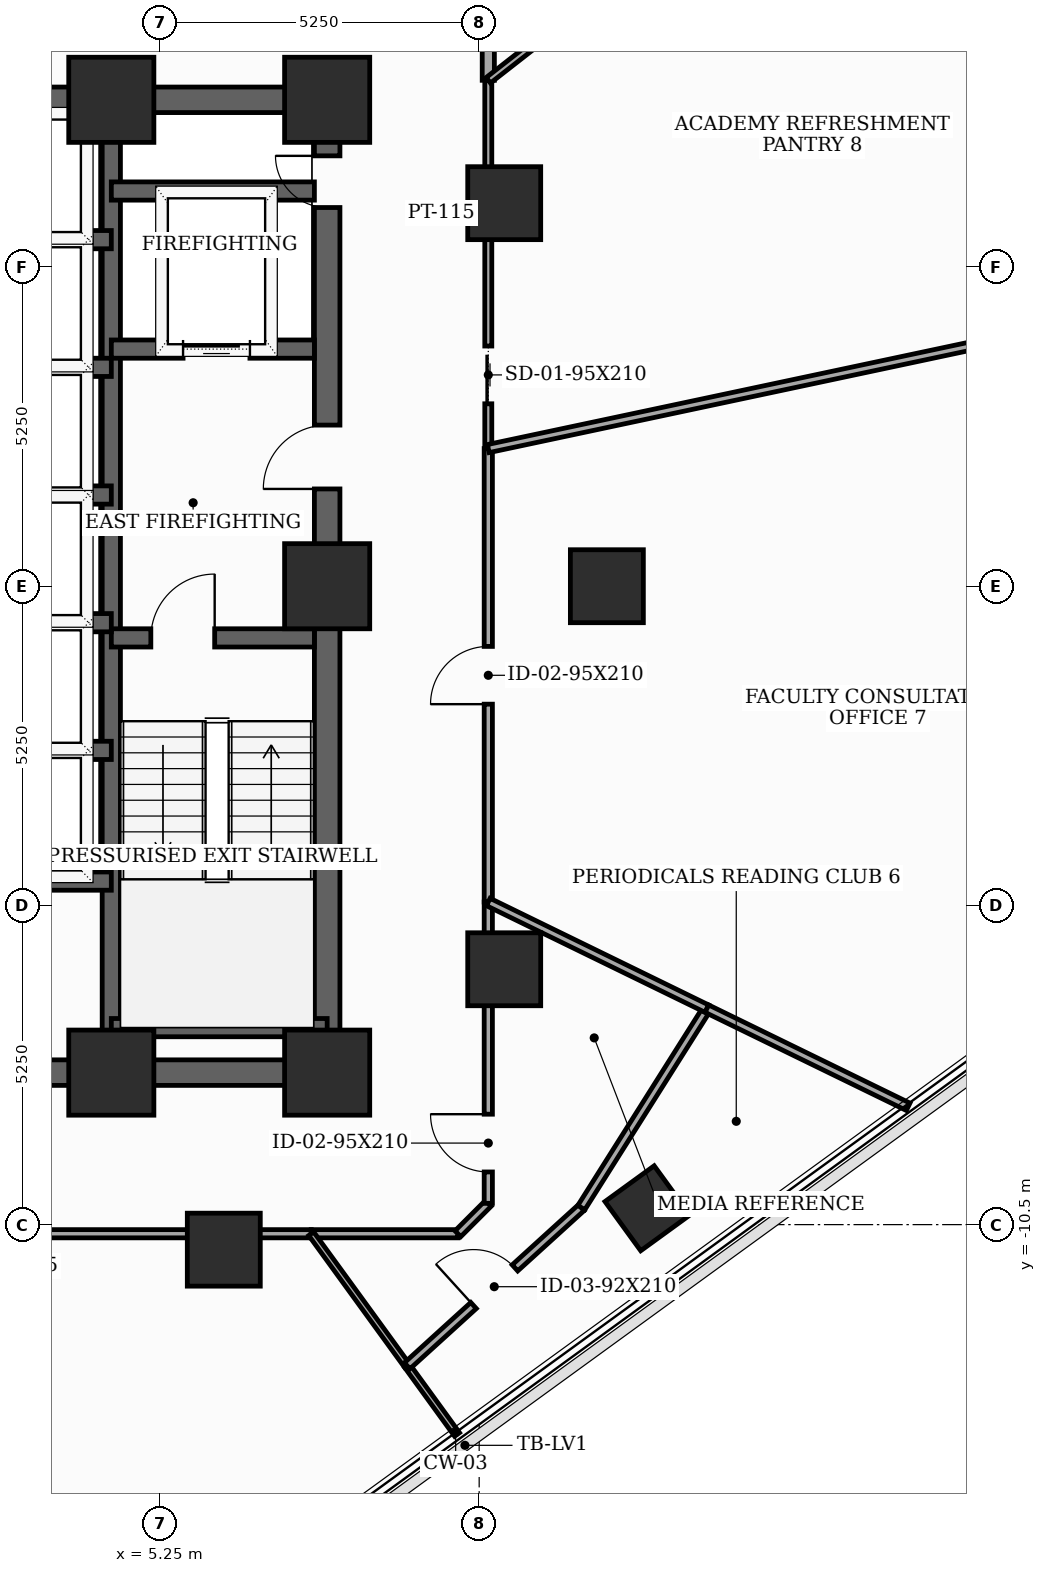
"""IFC4 building model, lengths in metres.
Left out: names, types, materials, properties, quantities, classifications, styles, units other than length and angle.
Written with IfcOpenShell. Run it as: python <this file> out.ifc"""

import sys

from ifc_helpers import new_model, si_unit, direction, frame, frame_2d, origin, origin_2d, place, context, subcontext, project, spatial, rectangle, extrude, element, fill, save


model = new_model("IFC4")
c1 = context("Model", 3, precision=1e-05, world=origin(), true_north=direction((0.0, 1.0)))
c2 = subcontext(c1, "Body", "Model", "MODEL_VIEW")
j1 = project(units=[si_unit("LENGTHUNIT", "METRE"), si_unit("PLANEANGLEUNIT", "RADIAN")], contexts=[c1])
p1 = place(None, origin())
s1 = spatial("IfcSite", under=j1, at=p1, CompositionType="ELEMENT")
p2 = place(p1, origin())
s2 = spatial("IfcBuilding", under=s1, at=p2, CompositionType="ELEMENT")
p3 = place(p2, frame((0.0, 0.0, 169.4)))
s3 = spatial("IfcBuildingStorey", under=s2, at=p3, CompositionType="ELEMENT", Elevation=169.4)
for number, where, z_axis, x_axis in (
    (1, (4.45, -8.0, 0.0), (0.0, 0.0, 1.0), (1.0, 0.0, 0.0)),
    (2, (8.0, -8.0, 0.0), (0.0, 0.0, 1.0), (1.0, 0.0, 0.0)),
    (3, (8.0, 0.0, 0.0), (0.0, 0.0, 1.0), (1.0, 0.0, 0.0)),
    (4, (8.0, 8.0, 0.0), (0.0, 0.0, 1.0), (1.0, 0.0, 0.0)),
    (5, (4.45, 8.0, 0.0), (0.0, 0.0, 1.0), (1.0, 0.0, 0.0)),
):
    element("IfcColumn", number, at=place(p3, frame(where, z_axis=z_axis, x_axis=x_axis)), inside=s3, PredefinedType="COLUMN", context=c2, shape_type="SweptSolid", body=[
        extrude(rectangle(XDim=1.4, YDim=1.4, at=origin_2d()), origin(), (0.0, 0.0, 1.0), 3.7),
    ])
for number, where, z_axis, x_axis in (
    (6, (12.6, 0.0, 0.0), (0.0, 0.0, 1.0), (1.0, 0.0, 0.0)),
    (7, (10.912, 6.3, 0.0), (0.0, 0.0, 1.0), (1.0, 0.0, 0.0)),
    (8, (6.3, -10.912, 0.0), (0.0, 0.0, 1.0), (1.0, 0.0, 0.0)),
    (9, (10.912, -6.3, 0.0), (0.0, 0.0, 1.0), (1.0, 0.0, 0.0)),
):
    element("IfcColumn", number, at=place(p3, frame(where, z_axis=z_axis, x_axis=x_axis)), inside=s3, PredefinedType="COLUMN", context=c2, shape_type="SweptSolid", body=[
        extrude(rectangle(XDim=1.2, YDim=1.2, at=origin_2d()), origin(), (0.0, 0.0, 1.0), 3.7),
    ])
p4 = place(p3, frame((13.268, -10.231, 0.0), z_axis=(0.0, 0.0, 1.0), x_axis=(0.809016994375, 0.587785252292, 0.0)))
e10 = element("IfcColumn", 10, at=p4, inside=s3, PredefinedType="COLUMN", context=c2, shape_type="SweptSolid", body=[
    extrude(rectangle(XDim=1.0, YDim=1.0, at=origin_2d()), origin(), (0.0, 0.0, 1.0), 3.7),
])
p5 = place(p3, frame((8.0, -8.0, 0.0), z_axis=(0.0, 0.0, 1.0), x_axis=(0.0, 1.0, 0.0)))
e11 = element("IfcWall", 11, at=p5, inside=s3, PredefinedType="SHEAR", context=c2, shape_type="SweptSolid", body=[
    extrude(rectangle(XDim=16.0, YDim=0.42, at=frame_2d((8.0, 0.0))), origin(), (0.0, 0.0, 1.0), 3.5),
])
p6 = place(p5, frame((9.6, 0.0, 0.0)))
e12 = element("IfcOpeningElement", 12, at=p6, cuts=e11, PredefinedType="OPENING", context=c2, shape_type="SweptSolid", body=[
    extrude(rectangle(XDim=1.05, YDim=2.15, at=frame_2d((0.525, 1.075))), frame((0.0, 0.22, 0.0), z_axis=(0.0, -1.0, 0.0), x_axis=(1.0, 0.0, 0.0)), (0.0, 0.0, 1.0), 0.44),
])
p7 = place(p5, frame((14.229, 0.0, 0.0)))
e13 = element("IfcOpeningElement", 13, at=p7, cuts=e11, PredefinedType="OPENING", context=c2, shape_type="SweptSolid", body=[
    extrude(rectangle(XDim=0.85, YDim=2.02, at=frame_2d((0.425, 1.01))), frame((0.0, 0.22, 0.0), z_axis=(0.0, -1.0, 0.0), x_axis=(1.0, 0.0, 0.0)), (0.0, 0.0, 1.0), 0.44),
])
p8 = place(p3, frame((-8.0, -8.0, 0.0), z_axis=(0.0, 0.0, 1.0), x_axis=(1.0, 0.0, 0.0)))
e14 = element("IfcWall", 14, at=p8, inside=s3, PredefinedType="SHEAR", context=c2, shape_type="SweptSolid", body=[
    extrude(rectangle(XDim=16.0, YDim=0.42, at=frame_2d((8.0, 0.0))), origin(), (0.0, 0.0, 1.0), 3.5),
])
p9 = place(p8, frame((4.6, 0.0, 0.0)))
e15 = element("IfcOpeningElement", 15, at=p9, cuts=e14, PredefinedType="OPENING", context=c2, shape_type="SweptSolid", body=[
    extrude(rectangle(XDim=0.95, YDim=2.1, at=frame_2d((0.475, 1.05))), frame((0.0, 0.22, 0.0), z_axis=(0.0, -1.0, 0.0), x_axis=(1.0, 0.0, 0.0)), (0.0, 0.0, 1.0), 0.44),
])
p10 = place(p8, frame((7.52, 0.0, 0.0)))
e16 = element("IfcOpeningElement", 16, at=p10, cuts=e14, PredefinedType="OPENING", context=c2, shape_type="SweptSolid", body=[
    extrude(rectangle(XDim=0.95, YDim=2.1, at=frame_2d((0.475, 1.05))), frame((0.0, 0.22, 0.0), z_axis=(0.0, -1.0, 0.0), x_axis=(1.0, 0.0, 0.0)), (0.0, 0.0, 1.0), 0.44),
])
p11 = place(p8, frame((10.45, 0.0, 0.0)))
e17 = element("IfcOpeningElement", 17, at=p11, cuts=e14, PredefinedType="OPENING", context=c2, shape_type="SweptSolid", body=[
    extrude(rectangle(XDim=0.95, YDim=2.1, at=frame_2d((0.475, 1.05))), frame((0.0, 0.22, 0.0), z_axis=(0.0, -1.0, 0.0), x_axis=(1.0, 0.0, 0.0)), (0.0, 0.0, 1.0), 0.44),
])
p12 = place(p3, frame((-8.0, 8.0, 0.0), z_axis=(0.0, 0.0, 1.0), x_axis=(1.0, 0.0, 0.0)))
e18 = element("IfcWall", 18, at=p12, inside=s3, PredefinedType="SHEAR", context=c2, shape_type="SweptSolid", body=[
    extrude(rectangle(XDim=16.0, YDim=0.42, at=frame_2d((8.0, 0.0))), origin(), (0.0, 0.0, 1.0), 3.5),
])
p13 = place(p12, frame((7.1, 0.0, 0.0)))
e19 = element("IfcOpeningElement", 19, at=p13, cuts=e18, PredefinedType="OPENING", context=c2, shape_type="SweptSolid", body=[
    extrude(rectangle(XDim=1.8, YDim=2.15, at=frame_2d((0.9, 1.075))), frame((0.0, 0.22, 0.0), z_axis=(0.0, -1.0, 0.0), x_axis=(1.0, 0.0, 0.0)), (0.0, 0.0, 1.0), 0.44),
])
p14 = place(p3, frame((4.45, -7.79, 0.0), z_axis=(0.0, 0.0, 1.0), x_axis=(0.0, 1.0, 0.0)))
e20 = element("IfcWall", 20, at=p14, inside=s3, PredefinedType="SHEAR", context=c2, shape_type="SweptSolid", body=[
    extrude(rectangle(XDim=15.58, YDim=0.3, at=frame_2d((7.79, 0.0))), origin(), (0.0, 0.0, 1.0), 3.5),
])
p15 = place(p3, frame((4.45, -0.85, 0.0), z_axis=(0.0, 0.0, 1.0), x_axis=(1.0, 0.0, 0.0)))
e21 = element("IfcWall", 21, at=p15, inside=s3, PredefinedType="SHEAR", context=c2, shape_type="SweptSolid", body=[
    extrude(rectangle(XDim=3.34, YDim=0.3, at=frame_2d((1.67, 0.0))), origin(), (0.0, 0.0, 1.0), 3.5),
])
p16 = place(p15, frame((0.65, 0.0, 0.0)))
e22 = element("IfcOpeningElement", 22, at=p16, cuts=e21, PredefinedType="OPENING", context=c2, shape_type="SweptSolid", body=[
    extrude(rectangle(XDim=1.05, YDim=2.15, at=frame_2d((0.525, 1.075))), frame((0.0, 0.16, 0.0), z_axis=(0.0, -1.0, 0.0), x_axis=(1.0, 0.0, 0.0)), (0.0, 0.0, 1.0), 0.32),
])
p17 = place(p3, frame((4.45, -7.26, 0.0), z_axis=(0.0, 0.0, 1.0), x_axis=(1.0, 0.0, 0.0)))
e23 = element("IfcWall", 23, at=p17, inside=s3, PredefinedType="SHEAR", context=c2, shape_type="SweptSolid", body=[
    extrude(rectangle(XDim=3.55, YDim=0.3, at=frame_2d((1.775, 0.0))), origin(), (0.0, 0.0, 1.0), 3.5),
])
p18 = place(p3, frame((4.45, 3.9, 0.0), z_axis=(0.0, 0.0, 1.0), x_axis=(1.0, 0.0, 0.0)))
e24 = element("IfcWall", 24, at=p18, inside=s3, PredefinedType="SHEAR", context=c2, shape_type="SweptSolid", body=[
    extrude(rectangle(XDim=3.34, YDim=0.3, at=frame_2d((1.67, 0.0))), origin(), (0.0, 0.0, 1.0), 3.5),
])
p19 = place(p18, frame((1.18, 0.0, 0.0)))
e25 = element("IfcOpeningElement", 25, at=p19, cuts=e24, PredefinedType="OPENING", context=c2, shape_type="SweptSolid", body=[
    extrude(rectangle(XDim=1.1, YDim=2.1, at=frame_2d((0.55, 1.05))), frame((0.0, 0.16, 0.0), z_axis=(0.0, -1.0, 0.0), x_axis=(1.0, 0.0, 0.0)), (0.0, 0.0, 1.0), 0.32),
])
p20 = place(p3, frame((4.45, 6.5, 0.0), z_axis=(0.0, 0.0, 1.0), x_axis=(1.0, 0.0, 0.0)))
e26 = element("IfcWall", 26, at=p20, inside=s3, PredefinedType="SHEAR", context=c2, shape_type="SweptSolid", body=[
    extrude(rectangle(XDim=3.34, YDim=0.3, at=frame_2d((1.67, 0.0))), origin(), (0.0, 0.0, 1.0), 3.5),
])
p21 = place(p3, frame((-4.45, -4.85, 0.0), z_axis=(0.0, 0.0, 1.0), x_axis=(1.0, 0.0, 0.0)))
e27 = element("IfcWall", 27, at=p21, inside=s3, PredefinedType="SHEAR", context=c2, shape_type="SweptSolid", body=[
    extrude(rectangle(XDim=8.9, YDim=0.3, at=frame_2d((4.45, 0.0))), origin(), (0.0, 0.0, 1.0), 3.5),
])
for number, where, z_axis, x_axis in (
    (28, (1.68, 1.5, 0.0), (0.0, 0.0, 1.0), (1.0, 0.0, 0.0)),
    (29, (1.68, 3.6, 0.0), (0.0, 0.0, 1.0), (1.0, 0.0, 0.0)),
    (30, (1.68, 5.7, 0.0), (0.0, 0.0, 1.0), (1.0, 0.0, 0.0)),
    (31, (1.68, -2.7, 0.0), (0.0, 0.0, 1.0), (1.0, 0.0, 0.0)),
    (32, (1.68, -0.6, 0.0), (0.0, 0.0, 1.0), (1.0, 0.0, 0.0)),
):
    element("IfcWall", number, at=place(p3, frame(where, z_axis=z_axis, x_axis=x_axis)), inside=s3, PredefinedType="SHEAR", context=c2, shape_type="SweptSolid", body=[
        extrude(rectangle(XDim=2.77, YDim=0.3, at=frame_2d((1.385, 0.0))), origin(), (0.0, 0.0, 1.0), 3.5),
    ])
p22 = place(p3, frame((-3.054, -10.65, 0.0), z_axis=(0.0, 0.0, 1.0), x_axis=(1.0, 0.0, 0.0)))
e33 = element("IfcWall", 33, at=p22, inside=s3, PredefinedType="PARTITIONING", context=c2, shape_type="SweptSolid", body=[
    extrude(rectangle(XDim=10.792, YDim=0.135, at=frame_2d((5.396, 0.0))), origin(), (0.0, 0.0, 1.0), 2.885),
])
p23 = place(p22, frame((4.596, 0.0, 0.0)))
e34 = element("IfcOpeningElement", 34, at=p23, cuts=e33, PredefinedType="OPENING", context=c2, shape_type="SweptSolid", body=[
    extrude(rectangle(XDim=1.6, YDim=2.15, at=frame_2d((0.8, 1.075))), frame((0.0, 0.077, 0.0), z_axis=(0.0, -1.0, 0.0), x_axis=(1.0, 0.0, 0.0)), (0.0, 0.0, 1.0), 0.155),
])
p24 = place(p3, frame((7.738, -10.65, 0.0), z_axis=(0.0, 0.0, 1.0), x_axis=(1.0, 0.0, 0.0)))
e35 = element("IfcWall", 35, at=p24, inside=s3, PredefinedType="PARTITIONING", context=c2, shape_type="SweptSolid", body=[
    extrude(rectangle(XDim=2.412, YDim=0.135, at=frame_2d((1.206, 0.0))), origin(), (0.0, 0.0, 1.0), 3.5),
])
p25 = place(p3, frame((10.15, -10.65, 0.0), z_axis=(0.0, 0.0, 1.0), x_axis=(0.707106781187, 0.707106781187, 0.0)))
e36 = element("IfcWall", 36, at=p25, inside=s3, PredefinedType="PARTITIONING", context=c2, shape_type="SweptSolid", body=[
    extrude(rectangle(XDim=0.707, YDim=0.135, at=frame_2d((0.354, 0.0))), origin(), (0.0, 0.0, 1.0), 3.5),
])
p26 = place(p3, frame((10.65, -10.15, 0.0), z_axis=(0.0, 0.0, 1.0), x_axis=(0.0, 1.0, 0.0)))
e37 = element("IfcWall", 37, at=p26, inside=s3, PredefinedType="PARTITIONING", context=c2, shape_type="SweptSolid", body=[
    extrude(rectangle(XDim=4.956, YDim=0.135, at=frame_2d((2.478, 0.0))), origin(), (0.0, 0.0, 1.0), 2.885),
])
p27 = place(p26, frame((0.516, 0.0, 0.0)))
e38 = element("IfcOpeningElement", 38, at=p27, cuts=e37, PredefinedType="OPENING", context=c2, shape_type="SweptSolid", body=[
    extrude(rectangle(XDim=0.95, YDim=2.1, at=frame_2d((0.475, 1.05))), frame((0.0, 0.077, 0.0), z_axis=(0.0, -1.0, 0.0), x_axis=(1.0, 0.0, 0.0)), (0.0, 0.0, 1.0), 0.155),
])
p28 = place(p3, frame((10.65, -5.194, 0.0), z_axis=(0.0, 0.0, 1.0), x_axis=(0.0, 1.0, 0.0)))
e39 = element("IfcWall", 39, at=p28, inside=s3, PredefinedType="PARTITIONING", context=c2, shape_type="SweptSolid", body=[
    extrude(rectangle(XDim=7.458, YDim=0.135, at=frame_2d((3.729, 0.0))), origin(), (0.0, 0.0, 1.0), 2.885),
])
p29 = place(p28, frame((3.254, 0.0, 0.0)))
e40 = element("IfcOpeningElement", 40, at=p29, cuts=e39, PredefinedType="OPENING", context=c2, shape_type="SweptSolid", body=[
    extrude(rectangle(XDim=0.95, YDim=2.1, at=frame_2d((0.475, 1.05))), frame((0.0, 0.077, 0.0), z_axis=(0.0, -1.0, 0.0), x_axis=(1.0, 0.0, 0.0)), (0.0, 0.0, 1.0), 0.155),
])
p30 = place(p3, frame((10.65, 2.264, 0.0), z_axis=(0.0, 0.0, 1.0), x_axis=(0.0, 1.0, 0.0)))
e41 = element("IfcWall", 41, at=p30, inside=s3, PredefinedType="PARTITIONING", context=c2, shape_type="SweptSolid", body=[
    extrude(rectangle(XDim=6.057, YDim=0.115, at=frame_2d((3.029, 0.0))), origin(), (0.0, 0.0, 1.0), 2.885),
])
p31 = place(p30, frame((0.736, 0.0, 0.0)))
e42 = element("IfcOpeningElement", 42, at=p31, cuts=e41, PredefinedType="OPENING", context=c2, shape_type="SweptSolid", body=[
    extrude(rectangle(XDim=0.95, YDim=2.1, at=frame_2d((0.475, 1.05))), frame((0.0, 0.067, 0.0), z_axis=(0.0, -1.0, 0.0), x_axis=(1.0, 0.0, 0.0)), (0.0, 0.0, 1.0), 0.135),
])
p32 = place(p3, frame((10.65, 8.321, 0.0), z_axis=(0.0, 0.0, 1.0), x_axis=(0.0, 1.0, 0.0)))
e43 = element("IfcWall", 43, at=p32, inside=s3, PredefinedType="SOLIDWALL", context=c2, shape_type="SweptSolid", body=[
    extrude(rectangle(XDim=1.829, YDim=0.2, at=frame_2d((0.915, 0.0))), origin(), (0.0, 0.0, 1.0), 3.5),
])
p33 = place(p3, frame((9.316, -12.822, 0.0), z_axis=(0.0, 0.0, 1.0), x_axis=(-0.587722823028, 0.80906234821, 0.0)))
e44 = element("IfcWall", 44, at=p33, inside=s3, PredefinedType="MOVABLE", context=c2, shape_type="SweptSolid", body=[
    extrude(rectangle(XDim=2.685, YDim=0.1, at=frame_2d((1.342, 0.0))), origin(), (0.0, 0.0, 1.0), 3.5),
])
p34 = place(p3, frame((10.136, -13.952, 0.0), z_axis=(0.0, 0.0, 1.0), x_axis=(-0.587422991792, 0.809280068156, 0.0)))
e45 = element("IfcWall", 45, at=p34, inside=s3, PredefinedType="MOVABLE", context=c2, shape_type="SweptSolid", body=[
    extrude(rectangle(XDim=1.396, YDim=0.1, at=frame_2d((0.698, 0.0))), origin(), (0.0, 0.0, 1.0), 2.985),
])
p35 = place(p3, frame((9.316, -12.822, 0.0), z_axis=(0.0, 0.0, 1.0), x_axis=(0.740145591151, 0.672446655058, 0.0)))
e46 = element("IfcWall", 46, at=p35, inside=s3, PredefinedType="PARTITIONING", context=c2, shape_type="SweptSolid", body=[
    extrude(rectangle(XDim=3.87, YDim=0.135, at=frame_2d((1.935, 0.0))), origin(), (0.0, 0.0, 1.0), 2.985),
])
p36 = place(p35, frame((1.475, 0.0, 0.0)))
e47 = element("IfcOpeningElement", 47, at=p36, cuts=e46, PredefinedType="OPENING", context=c2, shape_type="SweptSolid", body=[
    extrude(rectangle(XDim=0.92, YDim=2.1, at=frame_2d((0.46, 1.05))), frame((0.0, 0.077, 0.0), z_axis=(0.0, -1.0, 0.0), x_axis=(1.0, 0.0, 0.0)), (0.0, 0.0, 1.0), 0.155),
])
p37 = place(p3, frame((12.18, -10.22, 0.0), z_axis=(0.0, 0.0, 1.0), x_axis=(0.533748447558, 0.845643302302, 0.0)))
e48 = element("IfcWall", 48, at=p37, inside=s3, PredefinedType="PARTITIONING", context=c2, shape_type="SweptSolid", body=[
    extrude(rectangle(XDim=3.869, YDim=0.135, at=frame_2d((1.935, 0.0))), origin(), (0.0, 0.0, 1.0), 2.885),
])
p38 = place(p3, frame((14.245, -6.948, 0.0), z_axis=(0.0, 0.0, 1.0), x_axis=(-0.898754367686, 0.43845249066, 0.0)))
e49 = element("IfcWall", 49, at=p38, inside=s3, PredefinedType="PARTITIONING", context=c2, shape_type="SweptSolid", body=[
    extrude(rectangle(XDim=4.0, YDim=0.135, at=frame_2d((2.0, 0.0))), origin(), (0.0, 0.0, 1.0), 2.885),
])
p39 = place(p3, frame((17.555, -8.562, 0.0), z_axis=(0.0, 0.0, 1.0), x_axis=(-0.898837884032, 0.438281254708, 0.0)))
e50 = element("IfcWall", 50, at=p39, inside=s3, PredefinedType="PARTITIONING", context=c2, shape_type="SweptSolid", body=[
    extrude(rectangle(XDim=3.683, YDim=0.135, at=frame_2d((1.841, 0.0))), origin(), (0.0, 0.0, 1.0), 2.985),
])
p40 = place(p3, frame((28.651, 6.09, 0.0), z_axis=(0.0, 0.0, 1.0), x_axis=(-0.978150893197, -0.207896200392, 0.0)))
e51 = element("IfcWall", 51, at=p40, inside=s3, PredefinedType="PARTITIONING", context=c2, shape_type="SweptSolid", body=[
    extrude(rectangle(XDim=18.403, YDim=0.135, at=frame_2d((9.202, 0.0))), origin(), (0.0, 0.0, 1.0), 2.885),
])
p41 = place(p3, frame((12.391, 9.681, 0.0), z_axis=(0.0, 0.0, 1.0), x_axis=(-0.788124883644, -0.615515367624, 0.0)))
e52 = element("IfcWall", 52, at=p41, inside=s3, PredefinedType="PARTITIONING", context=c2, shape_type="SweptSolid", body=[
    extrude(rectangle(XDim=2.209, YDim=0.115, at=frame_2d((1.104, 0.0))), origin(), (0.0, 0.0, 1.0), 3.5),
])
p42 = place(p6, origin())
e53 = element("IfcDoor", 53, at=p42, inside=s3, OperationType="SINGLE_SWING_LEFT", PredefinedType="DOOR", context=c2, shape_type="SweptSolid", body=[
    extrude(rectangle(XDim=1.05, YDim=2.15, at=frame_2d((0.525, 1.075))), frame((0.0, 0.025, 0.0), z_axis=(0.0, -1.0, 0.0), x_axis=(1.0, 0.0, 0.0)), (0.0, 0.0, 1.0), 0.05),
])
fill(e12, e53)
p43 = place(p7, origin())
e54 = element("IfcDoor", 54, at=p43, inside=s3, OperationType="SINGLE_SWING_RIGHT", PredefinedType="TRAPDOOR", context=c2, shape_type="SweptSolid", body=[
    extrude(rectangle(XDim=0.85, YDim=2.02, at=frame_2d((0.425, 1.01))), frame((0.0, 0.025, 0.0), z_axis=(0.0, -1.0, 0.0), x_axis=(1.0, 0.0, 0.0)), (0.0, 0.0, 1.0), 0.05),
])
fill(e13, e54)
p44 = place(p16, origin())
e55 = element("IfcDoor", 55, at=p44, inside=s3, OperationType="SINGLE_SWING_RIGHT", PredefinedType="DOOR", context=c2, shape_type="SweptSolid", body=[
    extrude(rectangle(XDim=1.05, YDim=2.15, at=frame_2d((0.525, 1.075))), frame((0.0, 0.025, 0.0), z_axis=(0.0, -1.0, 0.0), x_axis=(1.0, 0.0, 0.0)), (0.0, 0.0, 1.0), 0.05),
])
fill(e22, e55)
p45 = place(p19, origin())
e56 = element("IfcDoor", 56, at=p45, inside=s3, OperationType="SLIDING_TO_LEFT", PredefinedType="DOOR", context=c2, shape_type="SweptSolid", body=[
    extrude(rectangle(XDim=1.1, YDim=2.1, at=frame_2d((0.55, 1.05))), frame((0.0, 0.025, 0.0), z_axis=(0.0, -1.0, 0.0), x_axis=(1.0, 0.0, 0.0)), (0.0, 0.0, 1.0), 0.05),
])
fill(e25, e56)
p46 = place(p27, origin())
e57 = element("IfcDoor", 57, at=p46, inside=s3, OperationType="SINGLE_SWING_RIGHT", PredefinedType="DOOR", context=c2, shape_type="SweptSolid", body=[
    extrude(rectangle(XDim=0.95, YDim=2.1, at=frame_2d((0.475, 1.05))), frame((0.0, 0.025, 0.0), z_axis=(0.0, -1.0, 0.0), x_axis=(1.0, 0.0, 0.0)), (0.0, 0.0, 1.0), 0.05),
])
fill(e38, e57)
p47 = place(p29, origin())
e58 = element("IfcDoor", 58, at=p47, inside=s3, OperationType="SINGLE_SWING_LEFT", PredefinedType="DOOR", context=c2, shape_type="SweptSolid", body=[
    extrude(rectangle(XDim=0.95, YDim=2.1, at=frame_2d((0.475, 1.05))), frame((0.0, 0.025, 0.0), z_axis=(0.0, -1.0, 0.0), x_axis=(1.0, 0.0, 0.0)), (0.0, 0.0, 1.0), 0.05),
])
fill(e40, e58)
p48 = place(p31, origin())
e59 = element("IfcDoor", 59, at=p48, inside=s3, OperationType="SLIDING_TO_LEFT", PredefinedType="DOOR", context=c2, shape_type="SweptSolid", body=[
    extrude(rectangle(XDim=0.95, YDim=2.1, at=frame_2d((0.475, 1.05))), frame((0.0, 0.025, 0.0), z_axis=(0.0, -1.0, 0.0), x_axis=(1.0, 0.0, 0.0)), (0.0, 0.0, 1.0), 0.05),
])
fill(e42, e59)
p49 = place(p36, origin())
e60 = element("IfcDoor", 60, at=p49, inside=s3, OperationType="SINGLE_SWING_LEFT", PredefinedType="DOOR", context=c2, shape_type="SweptSolid", body=[
    extrude(rectangle(XDim=0.92, YDim=2.1, at=frame_2d((0.46, 1.05))), frame((0.0, 0.025, 0.0), z_axis=(0.0, -1.0, 0.0), x_axis=(1.0, 0.0, 0.0)), (0.0, 0.0, 1.0), 0.05),
])
fill(e47, e60)
save(model, sys.argv[1])
